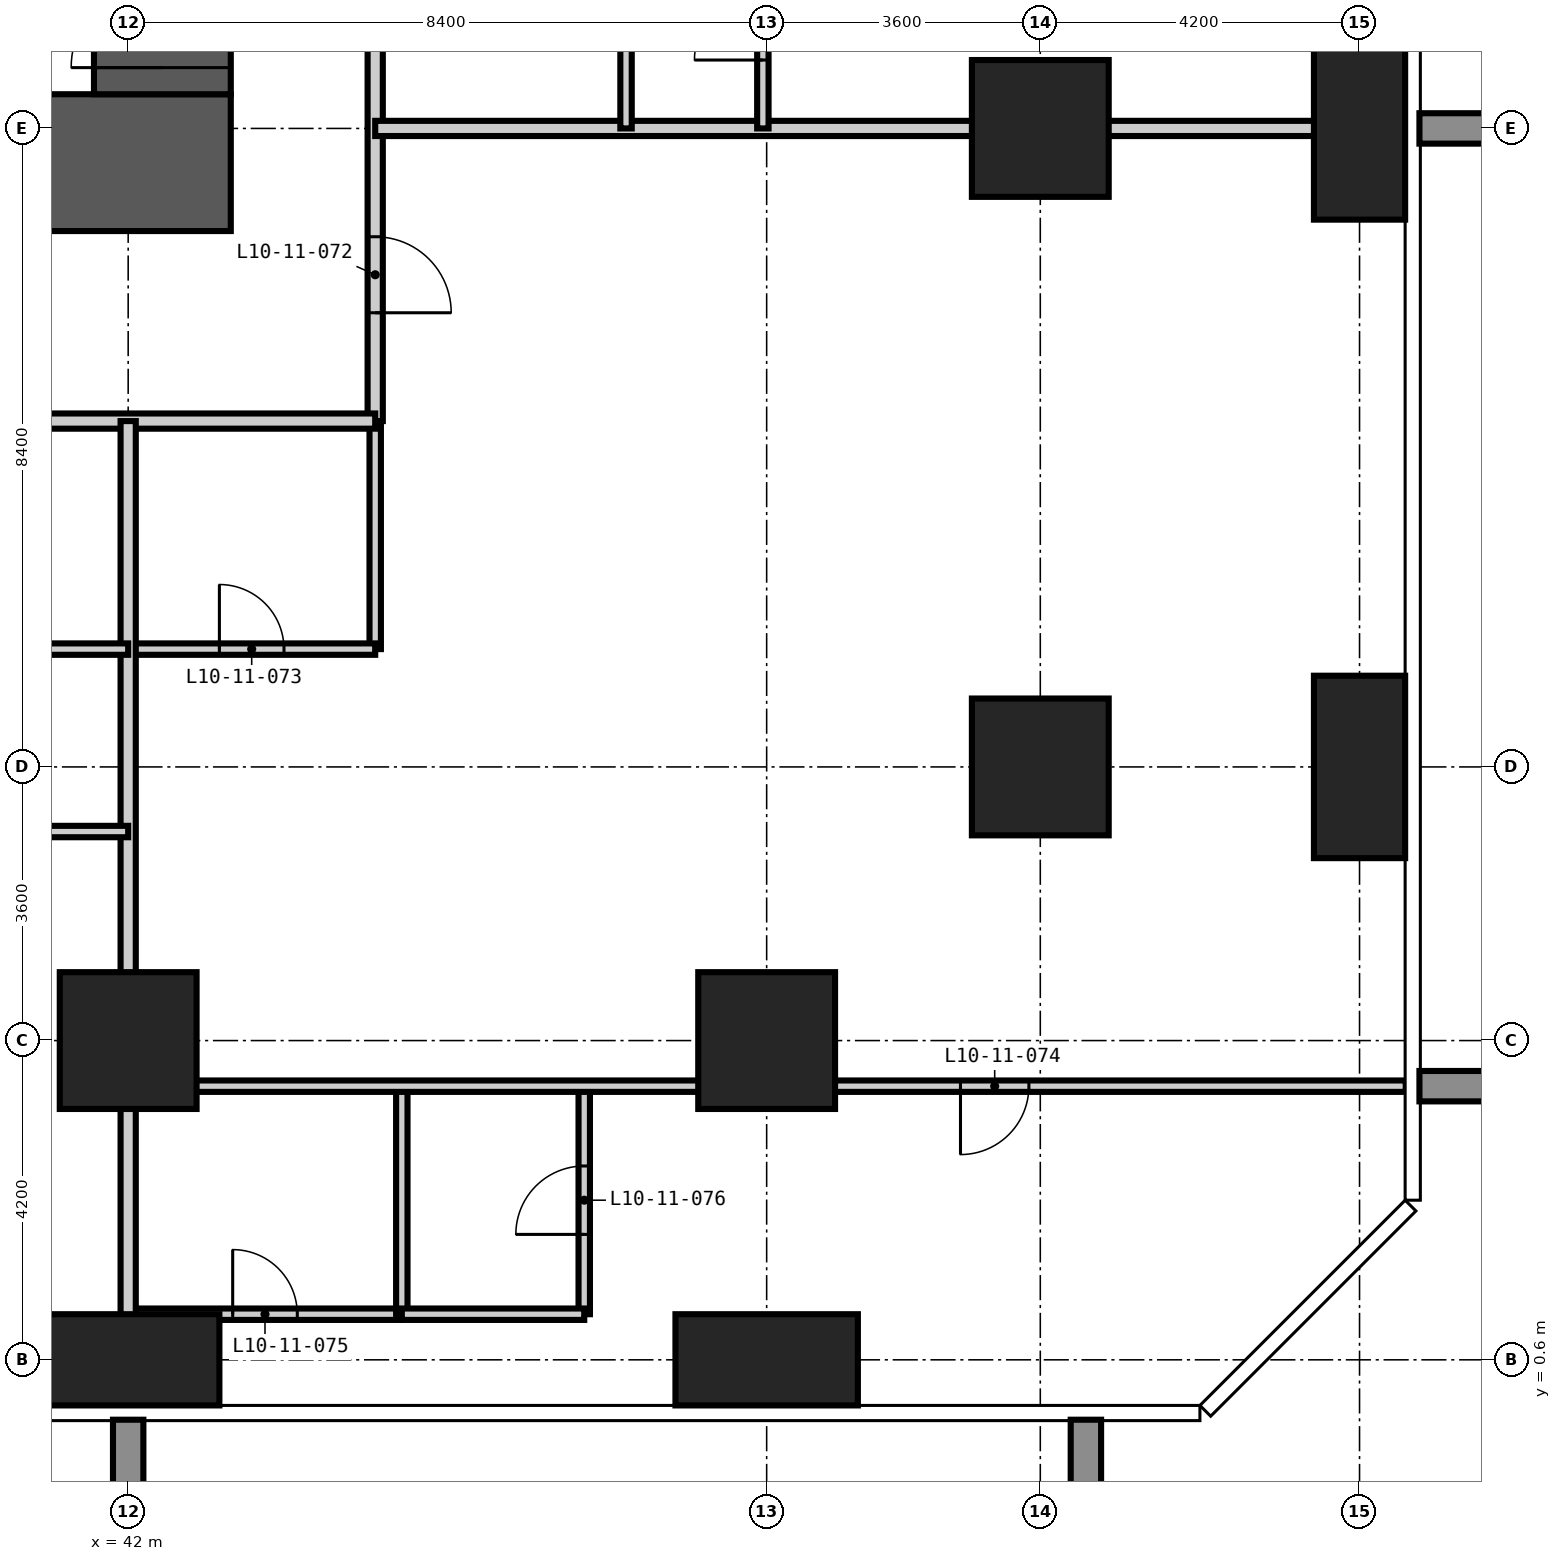
"""IFC4 building model, lengths in metres.
Left out: names, types, materials, properties, quantities, classifications, styles, units other than length and angle.
Written with IfcOpenShell. Run it as: python <this file> out.ifc"""

import sys

from ifc_helpers import new_model, si_unit, direction, frame, frame_2d, origin, origin_2d, place, context, subcontext, project, spatial, rectangle, extrude, element, fill, save


model = new_model("IFC4")
c1 = context("Model", 3, precision=1e-05, world=origin(), true_north=direction((0.0, 1.0)))
c2 = subcontext(c1, "Body", "Model", "MODEL_VIEW")
j1 = project(units=[si_unit("LENGTHUNIT", "METRE"), si_unit("PLANEANGLEUNIT", "RADIAN")], contexts=[c1])
p1 = place(None, origin())
s1 = spatial("IfcSite", under=j1, at=p1, CompositionType="ELEMENT")
p2 = place(p1, origin())
s2 = spatial("IfcBuilding", under=s1, at=p2, CompositionType="ELEMENT")
p3 = place(p2, frame((0.0, 0.0, 45.0)))
s3 = spatial("IfcBuildingStorey", under=s2, at=p3, CompositionType="ELEMENT", Elevation=45.0)
p4 = place(p3, frame((42.0, 0.6, -0.35), z_axis=(0.0, 0.0, 1.0), x_axis=(1.0, 0.0, 0.0)))
e1 = element("IfcColumn", 1, at=p4, inside=s3, PredefinedType="COLUMN", context=c2, shape_type="SweptSolid", body=[
    extrude(rectangle(XDim=2.4, YDim=1.2, at=origin_2d()), origin(), (0.0, 0.0, 1.0), 3.6),
])
p5 = place(p3, frame((42.0, 4.8, -0.35), z_axis=(0.0, 0.0, 1.0), x_axis=(1.0, 0.0, 0.0)))
e2 = element("IfcColumn", 2, at=p5, inside=s3, PredefinedType="COLUMN", context=c2, shape_type="SweptSolid", body=[
    extrude(rectangle(XDim=1.8, YDim=1.8, at=origin_2d()), origin(), (0.0, 0.0, 1.0), 3.6),
])
p6 = place(p3, frame((50.4, 0.6, -0.35), z_axis=(0.0, 0.0, 1.0), x_axis=(1.0, 0.0, 0.0)))
e3 = element("IfcColumn", 3, at=p6, inside=s3, PredefinedType="COLUMN", context=c2, shape_type="SweptSolid", body=[
    extrude(rectangle(XDim=2.4, YDim=1.2, at=origin_2d()), origin(), (0.0, 0.0, 1.0), 3.6),
])
for number, where, z_axis, x_axis in (
    (4, (50.4, 4.8, -0.35), (0.0, 0.0, 1.0), (1.0, 0.0, 0.0)),
    (5, (54.0, 8.4, -0.35), (0.0, 0.0, 1.0), (1.0, 0.0, 0.0)),
    (6, (54.0, 16.8, -0.35), (0.0, 0.0, 1.0), (1.0, 0.0, 0.0)),
):
    element("IfcColumn", number, at=place(p3, frame(where, z_axis=z_axis, x_axis=x_axis)), inside=s3, PredefinedType="COLUMN", context=c2, shape_type="SweptSolid", body=[
        extrude(rectangle(XDim=1.8, YDim=1.8, at=origin_2d()), origin(), (0.0, 0.0, 1.0), 3.6),
    ])
for number, where, z_axis, x_axis in (
    (7, (58.2, 8.4, -0.35), (0.0, 0.0, 1.0), (1.0, 0.0, 0.0)),
    (8, (58.2, 16.8, -0.35), (0.0, 0.0, 1.0), (1.0, 0.0, 0.0)),
):
    element("IfcColumn", number, at=place(p3, frame(where, z_axis=z_axis, x_axis=x_axis)), inside=s3, PredefinedType="COLUMN", context=c2, shape_type="SweptSolid", body=[
        extrude(rectangle(XDim=1.2, YDim=2.4, at=origin_2d()), origin(), (0.0, 0.0, 1.0), 3.6),
    ])
p7 = place(p3, frame((15.45, 16.35, -0.35), z_axis=(0.0, 0.0, 1.0), x_axis=(1.0, 0.0, 0.0)))
e9 = element("IfcWall", 9, at=p7, inside=s3, PredefinedType="SHEAR", context=c2, shape_type="SweptSolid", body=[
    extrude(rectangle(XDim=27.9, YDim=1.8, at=frame_2d((13.95, 0.0))), origin(), (0.0, 0.0, 1.0), 3.6),
])
p8 = place(p7, frame((13.45, 0.0, 0.35)))
e10 = element("IfcOpeningElement", 10, at=p8, cuts=e9, PredefinedType="OPENING", context=c2, shape_type="SweptSolid", body=[
    extrude(rectangle(XDim=1.0, YDim=2.1, at=frame_2d((0.5, 1.05))), frame((0.0, 0.91, 0.0), z_axis=(0.0, -1.0, 0.0), x_axis=(1.0, 0.0, 0.0)), (0.0, 0.0, 1.0), 1.82),
])
p9 = place(p7, frame((19.75, 0.0, 0.35)))
e11 = element("IfcOpeningElement", 11, at=p9, cuts=e9, PredefinedType="OPENING", context=c2, shape_type="SweptSolid", body=[
    extrude(rectangle(XDim=1.0, YDim=2.1, at=frame_2d((0.5, 1.05))), frame((0.0, 0.91, 0.0), z_axis=(0.0, -1.0, 0.0), x_axis=(1.0, 0.0, 0.0)), (0.0, 0.0, 1.0), 1.82),
])
p10 = place(p3, frame((42.45, 17.25, -0.35), z_axis=(0.0, 0.0, 1.0), x_axis=(0.0, 1.0, 0.0)))
e12 = element("IfcWall", 12, at=p10, inside=s3, PredefinedType="SHEAR", context=c2, shape_type="SweptSolid", body=[
    extrude(rectangle(XDim=24.3, YDim=1.8, at=frame_2d((12.15, 0.0))), origin(), (0.0, 0.0, 1.0), 3.6),
])
p11 = place(p10, frame((0.35, 0.0, 0.35)))
e13 = element("IfcOpeningElement", 13, at=p11, cuts=e12, PredefinedType="OPENING", context=c2, shape_type="SweptSolid", body=[
    extrude(rectangle(XDim=1.2, YDim=2.2, at=frame_2d((0.6, 1.1))), frame((0.0, 0.91, 0.0), z_axis=(0.0, -1.0, 0.0), x_axis=(1.0, 0.0, 0.0)), (0.0, 0.0, 1.0), 1.82),
])
p12 = place(p10, frame((11.65, 0.0, 0.35)))
e14 = element("IfcOpeningElement", 14, at=p12, cuts=e12, PredefinedType="OPENING", context=c2, shape_type="SweptSolid", body=[
    extrude(rectangle(XDim=1.0, YDim=2.1, at=frame_2d((0.5, 1.05))), frame((0.0, 0.91, 0.0), z_axis=(0.0, -1.0, 0.0), x_axis=(1.0, 0.0, 0.0)), (0.0, 0.0, 1.0), 1.82),
])
p13 = place(p10, frame((20.05, 0.0, 0.35)))
e15 = element("IfcOpeningElement", 15, at=p13, cuts=e12, PredefinedType="OPENING", context=c2, shape_type="SweptSolid", body=[
    extrude(rectangle(XDim=1.0, YDim=2.1, at=frame_2d((0.5, 1.05))), frame((0.0, 0.91, 0.0), z_axis=(0.0, -1.0, 0.0), x_axis=(1.0, 0.0, 0.0)), (0.0, 0.0, 1.0), 1.82),
])
p14 = place(p3, frame((45.25, 9.95, 0.0), z_axis=(0.0, 0.0, 1.0), x_axis=(0.0, 1.0, 0.0)))
e16 = element("IfcWall", 16, at=p14, inside=s3, PredefinedType="PARTITIONING", context=c2, shape_type="SweptSolid", body=[
    extrude(rectangle(XDim=3.0, YDim=0.15, at=frame_2d((1.5, 0.0))), origin(), (0.0, 0.0, 1.0), 3.25),
])
p15 = place(p3, frame((42.0, 1.2, 0.0), z_axis=(0.0, 0.0, 1.0), x_axis=(1.0, 0.0, 0.0)))
e17 = element("IfcWall", 17, at=p15, inside=s3, PredefinedType="PARTITIONING", context=c2, shape_type="SweptSolid", body=[
    extrude(rectangle(XDim=3.6, YDim=0.15, at=frame_2d((1.8, 0.0))), origin(), (0.0, 0.0, 1.0), 3.25),
])
p16 = place(p15, frame((1.375, 0.0, 0.0)))
e18 = element("IfcOpeningElement", 18, at=p16, cuts=e17, PredefinedType="OPENING", context=c2, shape_type="SweptSolid", body=[
    extrude(rectangle(XDim=0.85, YDim=2.1, at=frame_2d((0.425, 1.05))), frame((0.0, 0.085, 0.0), z_axis=(0.0, -1.0, 0.0), x_axis=(1.0, 0.0, 0.0)), (0.0, 0.0, 1.0), 0.17),
])
p17 = place(p3, frame((42.0, 9.95, 0.0), z_axis=(0.0, 0.0, 1.0), x_axis=(1.0, 0.0, 0.0)))
e19 = element("IfcWall", 19, at=p17, inside=s3, PredefinedType="PARTITIONING", context=c2, shape_type="SweptSolid", body=[
    extrude(rectangle(XDim=3.25, YDim=0.15, at=frame_2d((1.625, 0.0))), origin(), (0.0, 0.0, 1.0), 3.25),
])
p18 = place(p17, frame((1.2, 0.0, 0.0)))
e20 = element("IfcOpeningElement", 20, at=p18, cuts=e19, PredefinedType="OPENING", context=c2, shape_type="SweptSolid", body=[
    extrude(rectangle(XDim=0.85, YDim=2.1, at=frame_2d((0.425, 1.05))), frame((0.0, 0.085, 0.0), z_axis=(0.0, -1.0, 0.0), x_axis=(1.0, 0.0, 0.0)), (0.0, 0.0, 1.0), 0.17),
])
p19 = place(p3, frame((45.25, 45.55, 0.0), z_axis=(0.0, 0.0, 1.0), x_axis=(0.0, -1.0, 0.0)))
e21 = element("IfcWall", 21, at=p19, inside=s3, PredefinedType="PARTITIONING", context=c2, shape_type="SweptSolid", body=[
    extrude(rectangle(XDim=32.6, YDim=0.2, at=frame_2d((16.3, 0.0))), origin(), (0.0, 0.0, 1.0), 3.25),
])
p20 = place(p19, frame((24.8, 0.0, 0.0)))
e22 = element("IfcOpeningElement", 22, at=p20, cuts=e21, PredefinedType="OPENING", context=c2, shape_type="SweptSolid", body=[
    extrude(rectangle(XDim=1.0, YDim=2.2, at=frame_2d((0.5, 1.1))), frame((0.0, 0.11, 0.0), z_axis=(0.0, -1.0, 0.0), x_axis=(1.0, 0.0, 0.0)), (0.0, 0.0, 1.0), 0.22),
])
p21 = place(p19, frame((19.85, 0.0, 0.0)))
e23 = element("IfcOpeningElement", 23, at=p21, cuts=e21, PredefinedType="OPENING", context=c2, shape_type="SweptSolid", body=[
    extrude(rectangle(XDim=1.0, YDim=2.2, at=frame_2d((0.5, 1.1))), frame((0.0, 0.11, 0.0), z_axis=(0.0, -1.0, 0.0), x_axis=(1.0, 0.0, 0.0)), (0.0, 0.0, 1.0), 0.22),
])
p22 = place(p19, frame((11.45, 0.0, 0.0)))
e24 = element("IfcOpeningElement", 24, at=p22, cuts=e21, PredefinedType="OPENING", context=c2, shape_type="SweptSolid", body=[
    extrude(rectangle(XDim=1.0, YDim=2.2, at=frame_2d((0.5, 1.1))), frame((0.0, 0.11, 0.0), z_axis=(0.0, -1.0, 0.0), x_axis=(1.0, 0.0, 0.0)), (0.0, 0.0, 1.0), 0.22),
])
p23 = place(p19, frame((6.5, 0.0, 0.0)))
e25 = element("IfcOpeningElement", 25, at=p23, cuts=e21, PredefinedType="OPENING", context=c2, shape_type="SweptSolid", body=[
    extrude(rectangle(XDim=1.0, YDim=2.2, at=frame_2d((0.5, 1.1))), frame((0.0, 0.11, 0.0), z_axis=(0.0, -1.0, 0.0), x_axis=(1.0, 0.0, 0.0)), (0.0, 0.0, 1.0), 0.22),
])
p24 = place(p19, frame((30.175, 0.0, 0.0)))
e26 = element("IfcOpeningElement", 26, at=p24, cuts=e21, PredefinedType="OPENING", context=c2, shape_type="SweptSolid", body=[
    extrude(rectangle(XDim=1.0, YDim=2.2, at=frame_2d((0.5, 1.1))), frame((0.0, 0.11, 0.0), z_axis=(0.0, -1.0, 0.0), x_axis=(1.0, 0.0, 0.0)), (0.0, 0.0, 1.0), 0.22),
])
p25 = place(p19, frame((1.275, 0.0, 0.0)))
e27 = element("IfcOpeningElement", 27, at=p25, cuts=e21, PredefinedType="OPENING", context=c2, shape_type="SweptSolid", body=[
    extrude(rectangle(XDim=1.0, YDim=2.2, at=frame_2d((0.5, 1.1))), frame((0.0, 0.11, 0.0), z_axis=(0.0, -1.0, 0.0), x_axis=(1.0, 0.0, 0.0)), (0.0, 0.0, 1.0), 0.22),
])
p26 = place(p3, frame((45.25, 12.95, 0.0), z_axis=(0.0, 0.0, 1.0), x_axis=(-1.0, 0.0, 0.0)))
e28 = element("IfcWall", 28, at=p26, inside=s3, PredefinedType="PARTITIONING", context=c2, shape_type="SweptSolid", body=[
    extrude(rectangle(XDim=32.3, YDim=0.2, at=frame_2d((16.15, 0.0))), origin(), (0.0, 0.0, 1.0), 3.25),
])
p27 = place(p26, frame((24.65, 0.0, 0.0)))
e29 = element("IfcOpeningElement", 29, at=p27, cuts=e28, PredefinedType="OPENING", context=c2, shape_type="SweptSolid", body=[
    extrude(rectangle(XDim=1.0, YDim=2.2, at=frame_2d((0.5, 1.1))), frame((0.0, 0.11, 0.0), z_axis=(0.0, -1.0, 0.0), x_axis=(1.0, 0.0, 0.0)), (0.0, 0.0, 1.0), 0.22),
])
p28 = place(p26, frame((16.25, 0.0, 0.0)))
e30 = element("IfcOpeningElement", 30, at=p28, cuts=e28, PredefinedType="OPENING", context=c2, shape_type="SweptSolid", body=[
    extrude(rectangle(XDim=1.0, YDim=2.2, at=frame_2d((0.5, 1.1))), frame((0.0, 0.11, 0.0), z_axis=(0.0, -1.0, 0.0), x_axis=(1.0, 0.0, 0.0)), (0.0, 0.0, 1.0), 0.22),
])
p29 = place(p26, frame((7.85, 0.0, 0.0)))
e31 = element("IfcOpeningElement", 31, at=p29, cuts=e28, PredefinedType="OPENING", context=c2, shape_type="SweptSolid", body=[
    extrude(rectangle(XDim=1.0, YDim=2.2, at=frame_2d((0.5, 1.1))), frame((0.0, 0.11, 0.0), z_axis=(0.0, -1.0, 0.0), x_axis=(1.0, 0.0, 0.0)), (0.0, 0.0, 1.0), 0.22),
])
p30 = place(p3, frame((42.0, -0.008, 0.0), z_axis=(0.0, 0.0, 1.0), x_axis=(0.0, 1.0, 0.0)))
e32 = element("IfcWall", 32, at=p30, inside=s3, PredefinedType="PARTITIONING", context=c2, shape_type="SweptSolid", body=[
    extrude(rectangle(XDim=12.958, YDim=0.2, at=frame_2d((6.479, 0.0))), origin(), (0.0, 0.0, 1.0), 3.25),
])
p31 = place(p3, frame((45.25, 16.8, 0.0), z_axis=(0.0, 0.0, 1.0), x_axis=(1.0, 0.0, 0.0)))
e33 = element("IfcWall", 33, at=p31, inside=s3, PredefinedType="PARTITIONING", context=c2, shape_type="SweptSolid", body=[
    extrude(rectangle(XDim=13.558, YDim=0.2, at=frame_2d((6.779, 0.0))), origin(), (0.0, 0.0, 1.0), 3.25),
])
p32 = place(p3, frame((45.6, 1.2, 0.0), z_axis=(0.0, 0.0, 1.0), x_axis=(0.0, 1.0, 0.0)))
e34 = element("IfcWall", 34, at=p32, inside=s3, PredefinedType="PARTITIONING", context=c2, shape_type="SweptSolid", body=[
    extrude(rectangle(XDim=3.0, YDim=0.15, at=frame_2d((1.5, 0.0))), origin(), (0.0, 0.0, 1.0), 3.25),
])
p33 = place(p3, frame((48.0, 1.2, 0.0), z_axis=(0.0, 0.0, 1.0), x_axis=(0.0, 1.0, 0.0)))
e35 = element("IfcWall", 35, at=p33, inside=s3, PredefinedType="PARTITIONING", context=c2, shape_type="SweptSolid", body=[
    extrude(rectangle(XDim=3.0, YDim=0.15, at=frame_2d((1.5, 0.0))), origin(), (0.0, 0.0, 1.0), 3.25),
])
p34 = place(p33, frame((1.05, 0.0, 0.0)))
e36 = element("IfcOpeningElement", 36, at=p34, cuts=e35, PredefinedType="OPENING", context=c2, shape_type="SweptSolid", body=[
    extrude(rectangle(XDim=0.9, YDim=2.1, at=frame_2d((0.45, 1.05))), frame((0.0, 0.085, 0.0), z_axis=(0.0, -1.0, 0.0), x_axis=(1.0, 0.0, 0.0)), (0.0, 0.0, 1.0), 0.17),
])
p35 = place(p3, frame((48.55, 16.8, 0.0), z_axis=(0.0, 0.0, 1.0), x_axis=(0.0, 1.0, 0.0)))
e37 = element("IfcWall", 37, at=p35, inside=s3, PredefinedType="PARTITIONING", context=c2, shape_type="SweptSolid", body=[
    extrude(rectangle(XDim=2.7, YDim=0.15, at=frame_2d((1.35, 0.0))), origin(), (0.0, 0.0, 1.0), 3.25),
])
p36 = place(p3, frame((50.35, 16.8, 0.0), z_axis=(0.0, 0.0, 1.0), x_axis=(0.0, 1.0, 0.0)))
e38 = element("IfcWall", 38, at=p36, inside=s3, PredefinedType="PARTITIONING", context=c2, shape_type="SweptSolid", body=[
    extrude(rectangle(XDim=2.7, YDim=0.15, at=frame_2d((1.35, 0.0))), origin(), (0.0, 0.0, 1.0), 3.25),
])
p37 = place(p36, frame((0.9, 0.0, 0.0)))
e39 = element("IfcOpeningElement", 39, at=p37, cuts=e38, PredefinedType="OPENING", context=c2, shape_type="SweptSolid", body=[
    extrude(rectangle(XDim=0.9, YDim=2.1, at=frame_2d((0.45, 1.05))), frame((0.0, 0.085, 0.0), z_axis=(0.0, -1.0, 0.0), x_axis=(1.0, 0.0, 0.0)), (0.0, 0.0, 1.0), 0.17),
])
p38 = place(p3, frame((45.6, 1.2, 0.0), z_axis=(0.0, 0.0, 1.0), x_axis=(1.0, 0.0, 0.0)))
e40 = element("IfcWall", 40, at=p38, inside=s3, PredefinedType="PARTITIONING", context=c2, shape_type="SweptSolid", body=[
    extrude(rectangle(XDim=2.4, YDim=0.15, at=frame_2d((1.2, 0.0))), origin(), (0.0, 0.0, 1.0), 3.25),
])
p39 = place(p3, frame((42.0, 4.2, 0.0), z_axis=(0.0, 0.0, 1.0), x_axis=(1.0, 0.0, 0.0)))
e41 = element("IfcWall", 41, at=p39, inside=s3, PredefinedType="PARTITIONING", context=c2, shape_type="SweptSolid", body=[
    extrude(rectangle(XDim=16.808, YDim=0.15, at=frame_2d((8.404, 0.0))), origin(), (0.0, 0.0, 1.0), 3.25),
])
p40 = place(p39, frame((10.95, 0.0, 0.0)))
e42 = element("IfcOpeningElement", 42, at=p40, cuts=e41, PredefinedType="OPENING", context=c2, shape_type="SweptSolid", body=[
    extrude(rectangle(XDim=0.9, YDim=2.1, at=frame_2d((0.45, 1.05))), frame((0.0, 0.085, 0.0), z_axis=(0.0, -1.0, 0.0), x_axis=(1.0, 0.0, 0.0)), (0.0, 0.0, 1.0), 0.17),
])
p41 = place(p3, frame((37.8, 7.55, 0.0), z_axis=(0.0, 0.0, 1.0), x_axis=(1.0, 0.0, 0.0)))
e43 = element("IfcWall", 43, at=p41, inside=s3, PredefinedType="PARTITIONING", context=c2, shape_type="SweptSolid", body=[
    extrude(rectangle(XDim=4.2, YDim=0.15, at=frame_2d((2.1, 0.0))), origin(), (0.0, 0.0, 1.0), 3.25),
])
p42 = place(p41, frame((1.65, 0.0, 0.0)))
e44 = element("IfcOpeningElement", 44, at=p42, cuts=e43, PredefinedType="OPENING", context=c2, shape_type="SweptSolid", body=[
    extrude(rectangle(XDim=0.9, YDim=2.1, at=frame_2d((0.45, 1.05))), frame((0.0, 0.085, 0.0), z_axis=(0.0, -1.0, 0.0), x_axis=(1.0, 0.0, 0.0)), (0.0, 0.0, 1.0), 0.17),
])
p43 = place(p3, frame((37.8, 9.95, 0.0), z_axis=(0.0, 0.0, 1.0), x_axis=(1.0, 0.0, 0.0)))
e45 = element("IfcWall", 45, at=p43, inside=s3, PredefinedType="PARTITIONING", context=c2, shape_type="SweptSolid", body=[
    extrude(rectangle(XDim=4.2, YDim=0.15, at=frame_2d((2.1, 0.0))), origin(), (0.0, 0.0, 1.0), 3.25),
])
p44 = place(p11, origin())
e46 = element("IfcDoor", 46, at=p44, inside=s3, OperationType="SINGLE_SWING_LEFT", PredefinedType="DOOR", context=c2, shape_type="SweptSolid", body=[
    extrude(rectangle(XDim=1.2, YDim=2.2, at=frame_2d((0.6, 1.1))), frame((0.0, 0.025, 0.0), z_axis=(0.0, -1.0, 0.0), x_axis=(1.0, 0.0, 0.0)), (0.0, 0.0, 1.0), 0.05),
])
fill(e13, e46)
p45 = place(p37, origin())
e47 = element("IfcDoor", 47, at=p45, inside=s3, OperationType="SINGLE_SWING_LEFT", PredefinedType="DOOR", context=c2, shape_type="SweptSolid", body=[
    extrude(rectangle(XDim=0.9, YDim=2.1, at=frame_2d((0.45, 1.05))), frame((0.0, 0.025, 0.0), z_axis=(0.0, -1.0, 0.0), x_axis=(1.0, 0.0, 0.0)), (0.0, 0.0, 1.0), 0.05),
])
fill(e39, e47)
p46 = place(p24, origin())
e48 = element("IfcDoor", 48, at=p46, inside=s3, OperationType="SINGLE_SWING_RIGHT", PredefinedType="DOOR", context=c2, shape_type="SweptSolid", body=[
    extrude(rectangle(XDim=1.0, YDim=2.2, at=frame_2d((0.5, 1.1))), frame((0.0, 0.025, 0.0), z_axis=(0.0, -1.0, 0.0), x_axis=(1.0, 0.0, 0.0)), (0.0, 0.0, 1.0), 0.05),
])
fill(e26, e48)
p47 = place(p18, origin())
e49 = element("IfcDoor", 49, at=p47, inside=s3, OperationType="SINGLE_SWING_LEFT", PredefinedType="DOOR", context=c2, shape_type="SweptSolid", body=[
    extrude(rectangle(XDim=0.85, YDim=2.1, at=frame_2d((0.425, 1.05))), frame((0.0, 0.025, 0.0), z_axis=(0.0, -1.0, 0.0), x_axis=(1.0, 0.0, 0.0)), (0.0, 0.0, 1.0), 0.05),
])
fill(e20, e49)
p48 = place(p40, frame((0.9, 0.0, 0.0), z_axis=(0.0, 0.0, 1.0), x_axis=(-1.0, 0.0, 0.0)))
e50 = element("IfcDoor", 50, at=p48, inside=s3, OperationType="SINGLE_SWING_RIGHT", PredefinedType="DOOR", context=c2, shape_type="SweptSolid", body=[
    extrude(rectangle(XDim=0.9, YDim=2.1, at=frame_2d((0.45, 1.05))), frame((0.0, 0.025, 0.0), z_axis=(0.0, -1.0, 0.0), x_axis=(1.0, 0.0, 0.0)), (0.0, 0.0, 1.0), 0.05),
])
fill(e42, e50)
p49 = place(p16, origin())
e51 = element("IfcDoor", 51, at=p49, inside=s3, OperationType="SINGLE_SWING_LEFT", PredefinedType="DOOR", context=c2, shape_type="SweptSolid", body=[
    extrude(rectangle(XDim=0.85, YDim=2.1, at=frame_2d((0.425, 1.05))), frame((0.0, 0.025, 0.0), z_axis=(0.0, -1.0, 0.0), x_axis=(1.0, 0.0, 0.0)), (0.0, 0.0, 1.0), 0.05),
])
fill(e18, e51)
p50 = place(p34, origin())
e52 = element("IfcDoor", 52, at=p50, inside=s3, OperationType="SINGLE_SWING_LEFT", PredefinedType="DOOR", context=c2, shape_type="SweptSolid", body=[
    extrude(rectangle(XDim=0.9, YDim=2.1, at=frame_2d((0.45, 1.05))), frame((0.0, 0.025, 0.0), z_axis=(0.0, -1.0, 0.0), x_axis=(1.0, 0.0, 0.0)), (0.0, 0.0, 1.0), 0.05),
])
fill(e36, e52)
save(model, sys.argv[1])
